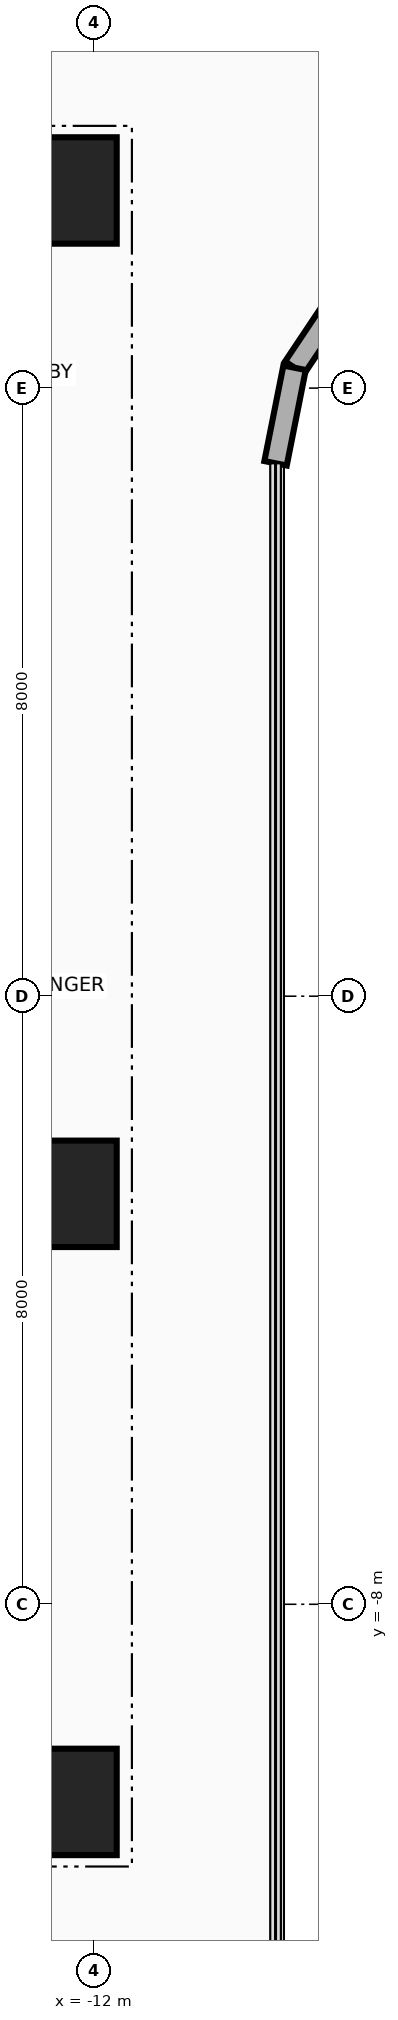
"""IFC4 building model, lengths in metres.
Left out: names, types, materials, properties, quantities, classifications, styles, units other than length and angle.
Written with IfcOpenShell. Run it as: python <this file> out.ifc"""

import sys

from ifc_helpers import new_model, si_unit, direction, frame, frame_2d, origin, origin_2d, place, context, subcontext, project, spatial, rectangle, extrude, source, transform, mapped, element, save


model = new_model("IFC4")
c1 = context("Model", 3, precision=1e-05, world=origin(), true_north=direction((0.0, 1.0)))
c2 = subcontext(c1, "Body", "Model", "MODEL_VIEW")
j1 = project(units=[si_unit("LENGTHUNIT", "METRE"), si_unit("PLANEANGLEUNIT", "RADIAN")], contexts=[c1])
p1 = place(None, origin())
s1 = spatial("IfcSite", under=j1, at=p1, CompositionType="ELEMENT")
p2 = place(p1, origin())
s2 = spatial("IfcBuilding", under=s1, at=p2, CompositionType="ELEMENT")
p3 = place(p2, frame((0.0, 0.0, 37.1)))
s3 = spatial("IfcBuildingStorey", under=s2, at=p3, CompositionType="ELEMENT", Elevation=37.1)
for number, where, z_axis, x_axis in (
    (1, (-22.65, 10.8, 0.0), (0.0, 0.0, 1.0), (1.0, 0.0, 0.0)),
    (2, (-22.65, -10.8, 0.0), (0.0, 0.0, 1.0), (1.0, 0.0, 0.0)),
):
    element("IfcWall", number, at=place(p3, frame(where, z_axis=z_axis, x_axis=x_axis)), inside=s3, PredefinedType="SHEAR", context=c2, shape_type="SweptSolid", body=[
        extrude(rectangle(XDim=10.25, YDim=0.7, at=frame_2d((5.125, 0.0))), origin(), (0.0, 0.0, 1.0), 3.46),
    ])
m1 = source(origin(), c2, "Body", "SweptSolid", [
    extrude(rectangle(XDim=1.4, YDim=1.4, at=origin_2d()), origin(), (0.0, 0.0, 1.0), 3.7),
])
for number, where, z_axis, x_axis in (
    (3, (-12.4, -10.6, 0.0), (0.0, 0.0, 1.0), (1.0, 0.0, 0.0)),
    (4, (-12.4, -2.6, 0.0), (0.0, 0.0, 1.0), (1.0, 0.0, 0.0)),
    (5, (-12.4, 10.6, 0.0), (0.0, 0.0, 1.0), (1.0, 0.0, 0.0)),
):
    element("IfcColumn", number, at=place(p3, frame(where, z_axis=z_axis, x_axis=x_axis)), inside=s3, PredefinedType="COLUMN", context=c2, shape_type="MappedRepresentation", body=[
        mapped(m1, transform((0.0, 0.0, 0.0), x_axis=(1.0, 0.0, 0.0), y_axis=(0.0, 1.0, 0.0), z_axis=(0.0, 0.0, 1.0), scale=1.0)),
    ])
p4 = place(p3, frame((-8.642, 9.342, 0.0), z_axis=(0.0, 0.0, 1.0), x_axis=(-0.555615398575, -0.831439431869, 0.0)))
e6 = element("IfcWall", 6, at=p4, inside=s3, PredefinedType="SOLIDWALL", context=c2, shape_type="SweptSolid", body=[
    extrude(rectangle(XDim=1.292, YDim=0.3, at=frame_2d((0.646, 0.0))), origin(), (0.0, 0.0, 1.0), 3.46),
])
p5 = place(p3, frame((-9.36, 8.268, 0.0), z_axis=(0.0, 0.0, 1.0), x_axis=(-0.195090163074, -0.980785312019, 0.0)))
e7 = element("IfcWall", 7, at=p5, inside=s3, PredefinedType="SOLIDWALL", context=c2, shape_type="SweptSolid", body=[
    extrude(rectangle(XDim=1.281, YDim=0.3, at=frame_2d((0.641, 0.0))), origin(), (0.0, 0.0, 1.0), 3.46),
])
save(model, sys.argv[1])
